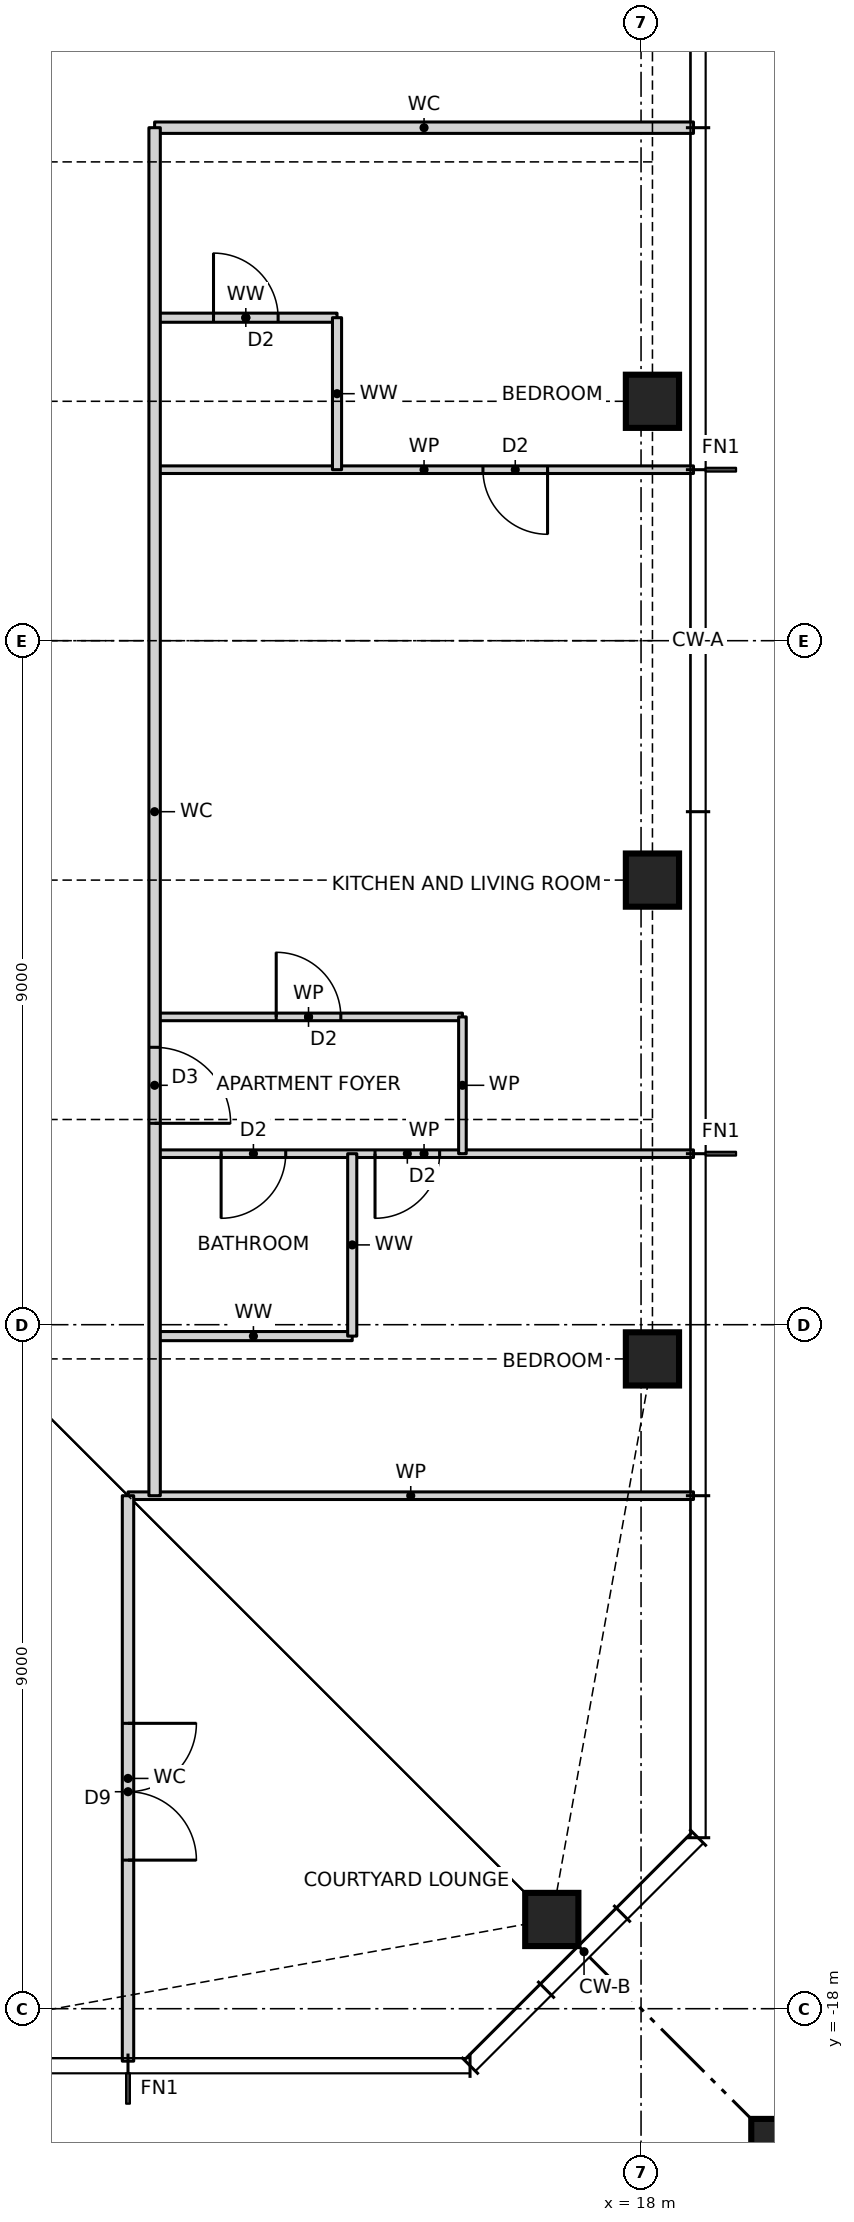
"""IFC4 building model, lengths in metres.
Left out: names, types, materials, properties, quantities, classifications, styles, units other than length and angle.
Written with IfcOpenShell. Run it as: python <this file> out.ifc"""

import sys

from ifc_helpers import new_model, si_unit, direction, frame, frame_2d, origin, origin_2d, place, context, subcontext, project, spatial, rectangle, hollow_rectangle, i_section, extrude, element, fill, save


model = new_model("IFC4")
c1 = context("Model", 3, precision=1e-05, world=origin(), true_north=direction((0.0, 1.0)))
c2 = subcontext(c1, "Body", "Model", "MODEL_VIEW")
j1 = project(units=[si_unit("LENGTHUNIT", "METRE"), si_unit("PLANEANGLEUNIT", "RADIAN")], contexts=[c1])
p1 = place(None, origin())
s1 = spatial("IfcSite", under=j1, at=p1, CompositionType="ELEMENT")
p2 = place(p1, origin())
s2 = spatial("IfcBuilding", under=s1, at=p2, CompositionType="ELEMENT")
p3 = place(p2, frame((0.0, 0.0, 177.5)))
s3 = spatial("IfcBuildingStorey", under=s2, at=p3, CompositionType="ELEMENT", Elevation=177.5)
for number, where, z_axis, x_axis in (
    (1, (16.826, -16.826, 0.0), (0.0, 0.0, 1.0), (1.0, 0.0, 0.0)),
    (2, (18.15, -9.45, 0.0), (0.0, 0.0, 1.0), (1.0, 0.0, 0.0)),
    (3, (18.15, -3.15, 0.0), (0.0, 0.0, 1.0), (1.0, 0.0, 0.0)),
    (4, (18.15, 3.15, 0.0), (0.0, 0.0, 1.0), (1.0, 0.0, 0.0)),
):
    element("IfcColumn", number, at=place(p3, frame(where, z_axis=z_axis, x_axis=x_axis)), inside=s3, PredefinedType="COLUMN", context=c2, shape_type="SweptSolid", body=[
        extrude(hollow_rectangle(XDim=0.7, YDim=0.7, WallThickness=0.06, at=origin_2d()), origin(), (0.0, 0.0, 1.0), 3.5),
    ])
p4 = place(p3, frame((21.65, -21.65, 0.0), z_axis=(0.0, 0.0, 1.0), x_axis=(1.0, 0.0, 0.0)))
e5 = element("IfcColumn", 5, at=p4, inside=s3, PredefinedType="COLUMN", context=c2, shape_type="SweptSolid", body=[
    extrude(rectangle(XDim=4.4, YDim=4.4, at=origin_2d()), origin(), (0.0, 0.0, 1.0), 3.5),
    extrude(i_section(OverallWidth=0.478, OverallDepth=0.599, WebThickness=0.1, FlangeThickness=0.14, at=origin_2d()), origin(), (0.0, 0.0, 1.0), 3.5),
])
p5 = place(p3, frame((11.25, -11.25, 0.0), z_axis=(0.0, 0.0, 1.0), x_axis=(1.0, 0.0, 0.0)))
e6 = element("IfcWall", 6, at=p5, inside=s3, PredefinedType="PARTITIONING", context=c2, shape_type="SweptSolid", body=[
    extrude(rectangle(XDim=7.44, YDim=0.1, at=frame_2d((3.72, 0.0))), origin(), (0.0, 0.0, 1.0), 3.27),
])
p6 = place(p3, frame((11.6, -9.15, 0.0), z_axis=(0.0, 0.0, 1.0), x_axis=(1.0, 0.0, 0.0)))
e7 = element("IfcWall", 7, at=p6, inside=s3, PredefinedType="PARTITIONING", context=c2, shape_type="SweptSolid", body=[
    extrude(rectangle(XDim=2.6, YDim=0.12, at=frame_2d((1.3, 0.0))), origin(), (0.0, 0.0, 1.0), 3.27),
])
p7 = place(p3, frame((11.6, -6.75, 0.0), z_axis=(0.0, 0.0, 1.0), x_axis=(1.0, 0.0, 0.0)))
e8 = element("IfcWall", 8, at=p7, inside=s3, PredefinedType="PARTITIONING", context=c2, shape_type="SweptSolid", body=[
    extrude(rectangle(XDim=7.09, YDim=0.1, at=frame_2d((3.545, 0.0))), origin(), (0.0, 0.0, 1.0), 3.27),
])
p8 = place(p7, frame((2.9, 0.0, 0.0)))
e9 = element("IfcOpeningElement", 9, at=p8, cuts=e8, PredefinedType="OPENING", context=c2, shape_type="SweptSolid", body=[
    extrude(rectangle(XDim=0.85, YDim=2.1, at=frame_2d((0.425, 1.05))), frame((0.0, 0.06, 0.0), z_axis=(0.0, -1.0, 0.0), x_axis=(1.0, 0.0, 0.0)), (0.0, 0.0, 1.0), 0.12),
])
p9 = place(p7, frame((0.875, 0.0, 0.0)))
e10 = element("IfcOpeningElement", 10, at=p9, cuts=e8, PredefinedType="OPENING", context=c2, shape_type="SweptSolid", body=[
    extrude(rectangle(XDim=0.85, YDim=2.1, at=frame_2d((0.425, 1.05))), frame((0.0, 0.06, 0.0), z_axis=(0.0, -1.0, 0.0), x_axis=(1.0, 0.0, 0.0)), (0.0, 0.0, 1.0), 0.12),
])
p10 = place(p3, frame((11.6, -4.95, 0.0), z_axis=(0.0, 0.0, 1.0), x_axis=(1.0, 0.0, 0.0)))
e11 = element("IfcWall", 11, at=p10, inside=s3, PredefinedType="PARTITIONING", context=c2, shape_type="SweptSolid", body=[
    extrude(rectangle(XDim=4.05, YDim=0.1, at=frame_2d((2.025, 0.0))), origin(), (0.0, 0.0, 1.0), 3.27),
])
p11 = place(p10, frame((1.6, 0.0, 0.0)))
e12 = element("IfcOpeningElement", 12, at=p11, cuts=e11, PredefinedType="OPENING", context=c2, shape_type="SweptSolid", body=[
    extrude(rectangle(XDim=0.85, YDim=2.1, at=frame_2d((0.425, 1.05))), frame((0.0, 0.06, 0.0), z_axis=(0.0, -1.0, 0.0), x_axis=(1.0, 0.0, 0.0)), (0.0, 0.0, 1.0), 0.12),
])
p12 = place(p3, frame((11.6, 2.25, 0.0), z_axis=(0.0, 0.0, 1.0), x_axis=(1.0, 0.0, 0.0)))
e13 = element("IfcWall", 13, at=p12, inside=s3, PredefinedType="PARTITIONING", context=c2, shape_type="SweptSolid", body=[
    extrude(rectangle(XDim=7.09, YDim=0.1, at=frame_2d((3.545, 0.0))), origin(), (0.0, 0.0, 1.0), 3.27),
])
p13 = place(p12, frame((4.32, 0.0, 0.0)))
e14 = element("IfcOpeningElement", 14, at=p13, cuts=e13, PredefinedType="OPENING", context=c2, shape_type="SweptSolid", body=[
    extrude(rectangle(XDim=0.85, YDim=2.1, at=frame_2d((0.425, 1.05))), frame((0.0, 0.06, 0.0), z_axis=(0.0, -1.0, 0.0), x_axis=(1.0, 0.0, 0.0)), (0.0, 0.0, 1.0), 0.12),
])
p14 = place(p3, frame((11.6, 4.25, 0.0), z_axis=(0.0, 0.0, 1.0), x_axis=(1.0, 0.0, 0.0)))
e15 = element("IfcWall", 15, at=p14, inside=s3, PredefinedType="PARTITIONING", context=c2, shape_type="SweptSolid", body=[
    extrude(rectangle(XDim=2.4, YDim=0.12, at=frame_2d((1.2, 0.0))), origin(), (0.0, 0.0, 1.0), 3.27),
])
p15 = place(p14, frame((0.775, 0.0, 0.0)))
e16 = element("IfcOpeningElement", 16, at=p15, cuts=e15, PredefinedType="OPENING", context=c2, shape_type="SweptSolid", body=[
    extrude(rectangle(XDim=0.85, YDim=2.1, at=frame_2d((0.425, 1.05))), frame((0.0, 0.07, 0.0), z_axis=(0.0, -1.0, 0.0), x_axis=(1.0, 0.0, 0.0)), (0.0, 0.0, 1.0), 0.14),
])
p16 = place(p3, frame((11.6, 6.75, 0.0), z_axis=(0.0, 0.0, 1.0), x_axis=(1.0, 0.0, 0.0)))
e17 = element("IfcWall", 17, at=p16, inside=s3, PredefinedType="PARTITIONING", context=c2, shape_type="SweptSolid", body=[
    extrude(rectangle(XDim=7.09, YDim=0.15, at=frame_2d((3.545, 0.0))), origin(), (0.0, 0.0, 1.0), 3.27),
])
p17 = place(p3, frame((15.65, -6.75, 0.0), z_axis=(0.0, 0.0, 1.0), x_axis=(0.0, 1.0, 0.0)))
e18 = element("IfcWall", 18, at=p17, inside=s3, PredefinedType="PARTITIONING", context=c2, shape_type="SweptSolid", body=[
    extrude(rectangle(XDim=1.8, YDim=0.1, at=frame_2d((0.9, 0.0))), origin(), (0.0, 0.0, 1.0), 3.27),
])
p18 = place(p3, frame((14.2, -9.15, 0.0), z_axis=(0.0, 0.0, 1.0), x_axis=(0.0, 1.0, 0.0)))
e19 = element("IfcWall", 19, at=p18, inside=s3, PredefinedType="PARTITIONING", context=c2, shape_type="SweptSolid", body=[
    extrude(rectangle(XDim=2.4, YDim=0.12, at=frame_2d((1.2, 0.0))), origin(), (0.0, 0.0, 1.0), 3.27),
])
p19 = place(p3, frame((14.0, 2.25, 0.0), z_axis=(0.0, 0.0, 1.0), x_axis=(0.0, 1.0, 0.0)))
e20 = element("IfcWall", 20, at=p19, inside=s3, PredefinedType="PARTITIONING", context=c2, shape_type="SweptSolid", body=[
    extrude(rectangle(XDim=2.0, YDim=0.12, at=frame_2d((1.0, 0.0))), origin(), (0.0, 0.0, 1.0), 3.27),
])
p20 = place(p3, frame((11.6, -11.25, 0.0), z_axis=(0.0, 0.0, 1.0), x_axis=(0.0, 1.0, 0.0)))
e21 = element("IfcWall", 21, at=p20, inside=s3, PredefinedType="PARTITIONING", context=c2, shape_type="SweptSolid", body=[
    extrude(rectangle(XDim=18.0, YDim=0.15, at=frame_2d((9.0, 0.0))), origin(), (0.0, 0.0, 1.0), 3.27),
])
p21 = place(p20, frame((4.9, 0.0, 0.0)))
e22 = element("IfcOpeningElement", 22, at=p21, cuts=e21, PredefinedType="OPENING", context=c2, shape_type="SweptSolid", body=[
    extrude(rectangle(XDim=1.0, YDim=2.1, at=frame_2d((0.5, 1.05))), frame((0.0, 0.085, 0.0), z_axis=(0.0, -1.0, 0.0), x_axis=(1.0, 0.0, 0.0)), (0.0, 0.0, 1.0), 0.17),
])
p22 = place(p3, frame((11.25, -18.69, 0.0), z_axis=(0.0, 0.0, 1.0), x_axis=(0.0, 1.0, 0.0)))
e23 = element("IfcWall", 23, at=p22, inside=s3, PredefinedType="PARTITIONING", context=c2, shape_type="SweptSolid", body=[
    extrude(rectangle(XDim=7.44, YDim=0.15, at=frame_2d((3.72, 0.0))), origin(), (0.0, 0.0, 1.0), 3.27),
])
p23 = place(p22, frame((2.645, 0.0, 0.0)))
e24 = element("IfcOpeningElement", 24, at=p23, cuts=e23, PredefinedType="OPENING", context=c2, shape_type="SweptSolid", body=[
    extrude(rectangle(XDim=1.8, YDim=2.1, at=frame_2d((0.9, 1.05))), frame((0.0, 0.085, 0.0), z_axis=(0.0, -1.0, 0.0), x_axis=(1.0, 0.0, 0.0)), (0.0, 0.0, 1.0), 0.17),
])
p24 = place(p21, frame((1.0, 0.0, 0.0), z_axis=(0.0, 0.0, 1.0), x_axis=(-1.0, 0.0, 0.0)))
e25 = element("IfcDoor", 25, at=p24, inside=s3, OperationType="SINGLE_SWING_RIGHT", PredefinedType="DOOR", context=c2, shape_type="SweptSolid", body=[
    extrude(rectangle(XDim=1.0, YDim=2.1, at=frame_2d((0.5, 1.05))), frame((0.0, 0.025, 0.0), z_axis=(0.0, -1.0, 0.0), x_axis=(1.0, 0.0, 0.0)), (0.0, 0.0, 1.0), 0.05),
])
fill(e22, e25)
p25 = place(p11, origin())
e26 = element("IfcDoor", 26, at=p25, inside=s3, OperationType="SINGLE_SWING_LEFT", PredefinedType="DOOR", context=c2, shape_type="SweptSolid", body=[
    extrude(rectangle(XDim=0.85, YDim=2.1, at=frame_2d((0.425, 1.05))), frame((0.0, 0.025, 0.0), z_axis=(0.0, -1.0, 0.0), x_axis=(1.0, 0.0, 0.0)), (0.0, 0.0, 1.0), 0.05),
])
fill(e12, e26)
p26 = place(p8, frame((0.85, 0.0, 0.0), z_axis=(0.0, 0.0, 1.0), x_axis=(-1.0, 0.0, 0.0)))
e27 = element("IfcDoor", 27, at=p26, inside=s3, OperationType="SINGLE_SWING_RIGHT", PredefinedType="DOOR", context=c2, shape_type="SweptSolid", body=[
    extrude(rectangle(XDim=0.85, YDim=2.1, at=frame_2d((0.425, 1.05))), frame((0.0, 0.025, 0.0), z_axis=(0.0, -1.0, 0.0), x_axis=(1.0, 0.0, 0.0)), (0.0, 0.0, 1.0), 0.05),
])
fill(e9, e27)
p27 = place(p9, frame((0.85, 0.0, 0.0), z_axis=(0.0, 0.0, 1.0), x_axis=(-1.0, 0.0, 0.0)))
e28 = element("IfcDoor", 28, at=p27, inside=s3, OperationType="SINGLE_SWING_RIGHT", PredefinedType="DOOR", context=c2, shape_type="SweptSolid", body=[
    extrude(rectangle(XDim=0.85, YDim=2.1, at=frame_2d((0.425, 1.05))), frame((0.0, 0.025, 0.0), z_axis=(0.0, -1.0, 0.0), x_axis=(1.0, 0.0, 0.0)), (0.0, 0.0, 1.0), 0.05),
])
fill(e10, e28)
p28 = place(p13, frame((0.85, 0.0, 0.0), z_axis=(0.0, 0.0, 1.0), x_axis=(-1.0, 0.0, 0.0)))
e29 = element("IfcDoor", 29, at=p28, inside=s3, OperationType="SINGLE_SWING_LEFT", PredefinedType="DOOR", context=c2, shape_type="SweptSolid", body=[
    extrude(rectangle(XDim=0.85, YDim=2.1, at=frame_2d((0.425, 1.05))), frame((0.0, 0.025, 0.0), z_axis=(0.0, -1.0, 0.0), x_axis=(1.0, 0.0, 0.0)), (0.0, 0.0, 1.0), 0.05),
])
fill(e14, e29)
p29 = place(p15, origin())
e30 = element("IfcDoor", 30, at=p29, inside=s3, OperationType="SINGLE_SWING_LEFT", PredefinedType="DOOR", context=c2, shape_type="SweptSolid", body=[
    extrude(rectangle(XDim=0.85, YDim=2.1, at=frame_2d((0.425, 1.05))), frame((0.0, 0.025, 0.0), z_axis=(0.0, -1.0, 0.0), x_axis=(1.0, 0.0, 0.0)), (0.0, 0.0, 1.0), 0.05),
])
fill(e16, e30)
p30 = place(p23, frame((1.8, 0.0, 0.0), z_axis=(0.0, 0.0, 1.0), x_axis=(-1.0, 0.0, 0.0)))
e31 = element("IfcDoor", 31, at=p30, inside=s3, OperationType="DOUBLE_DOOR_SINGLE_SWING", PredefinedType="DOOR", context=c2, shape_type="SweptSolid", body=[
    extrude(rectangle(XDim=1.8, YDim=2.1, at=frame_2d((0.9, 1.05))), frame((0.0, 0.025, 0.0), z_axis=(0.0, -1.0, 0.0), x_axis=(1.0, 0.0, 0.0)), (0.0, 0.0, 1.0), 0.05),
])
fill(e24, e31)
save(model, sys.argv[1])
